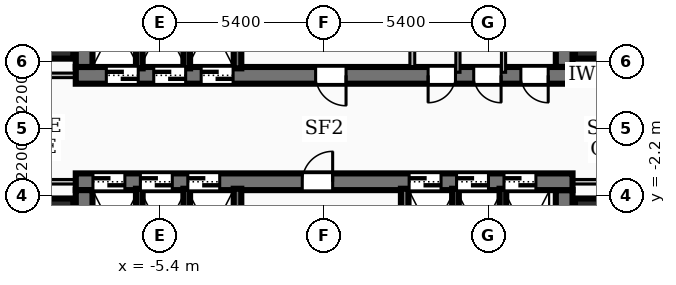
"""IFC4 building model, lengths in metres.
Left out: names, types, materials, properties, quantities, classifications, styles, units other than length and angle.
Written with IfcOpenShell. Run it as: python <this file> out.ifc"""

import sys

from ifc_helpers import new_model, si_unit, direction, frame, frame_2d, origin, origin_2d, place, context, subcontext, project, spatial, rectangle, extrude, element, fill, save


model = new_model("IFC4")
c1 = context("Model", 3, precision=1e-05, world=origin(), true_north=direction((0.0, 1.0)))
c2 = subcontext(c1, "Body", "Model", "MODEL_VIEW")
j1 = project(units=[si_unit("LENGTHUNIT", "METRE"), si_unit("PLANEANGLEUNIT", "RADIAN")], contexts=[c1])
p1 = place(None, origin())
s1 = spatial("IfcSite", under=j1, at=p1, CompositionType="ELEMENT")
p2 = place(p1, origin())
s2 = spatial("IfcBuilding", under=s1, at=p2, CompositionType="ELEMENT")
p3 = place(p2, frame((0.0, 0.0, 19.44)))
s3 = spatial("IfcBuildingStorey", under=s2, at=p3, CompositionType="ELEMENT", Elevation=19.44)
p4 = place(p3, frame((8.17, 1.75, 0.0), z_axis=(0.0, 0.0, 1.0), x_axis=(-1.0, 0.0, 0.0)))
e1 = element("IfcWall", 1, at=p4, inside=s3, PredefinedType="SHEAR", context=c2, shape_type="SweptSolid", body=[
    extrude(rectangle(XDim=16.34, YDim=0.55, at=frame_2d((8.17, 0.0))), origin(), (0.0, 0.0, 1.0), 4.78),
])
p5 = place(p4, frame((7.45, 0.0, 0.0)))
e2 = element("IfcOpeningElement", 2, at=p5, cuts=e1, PredefinedType="OPENING", context=c2, shape_type="SweptSolid", body=[
    extrude(rectangle(XDim=1.0, YDim=2.1, at=frame_2d((0.5, 1.05))), frame((0.0, 0.285, 0.0), z_axis=(0.0, -1.0, 0.0), x_axis=(1.0, 0.0, 0.0)), (0.0, 0.0, 1.0), 0.57),
])
p6 = place(p4, frame((14.285, 0.0, 0.0)))
e3 = element("IfcOpeningElement", 3, at=p6, cuts=e1, PredefinedType="OPENING", context=c2, shape_type="SweptSolid", body=[
    extrude(rectangle(XDim=1.05, YDim=2.15, at=frame_2d((0.525, 1.075))), frame((0.0, 0.285, 0.0), z_axis=(0.0, -1.0, 0.0), x_axis=(1.0, 0.0, 0.0)), (0.0, 0.0, 1.0), 0.57),
])
p7 = place(p4, frame((12.725, 0.0, 0.0)))
e4 = element("IfcOpeningElement", 4, at=p7, cuts=e1, PredefinedType="OPENING", context=c2, shape_type="SweptSolid", body=[
    extrude(rectangle(XDim=1.05, YDim=2.15, at=frame_2d((0.525, 1.075))), frame((0.0, 0.285, 0.0), z_axis=(0.0, -1.0, 0.0), x_axis=(1.0, 0.0, 0.0)), (0.0, 0.0, 1.0), 0.57),
])
p8 = place(p4, frame((11.165, 0.0, 0.0)))
e5 = element("IfcOpeningElement", 5, at=p8, cuts=e1, PredefinedType="OPENING", context=c2, shape_type="SweptSolid", body=[
    extrude(rectangle(XDim=1.05, YDim=2.15, at=frame_2d((0.525, 1.075))), frame((0.0, 0.285, 0.0), z_axis=(0.0, -1.0, 0.0), x_axis=(1.0, 0.0, 0.0)), (0.0, 0.0, 1.0), 0.57),
])
p9 = place(p4, frame((3.85, 0.0, 0.0)))
e6 = element("IfcOpeningElement", 6, at=p9, cuts=e1, PredefinedType="OPENING", context=c2, shape_type="SweptSolid", body=[
    extrude(rectangle(XDim=0.9, YDim=2.06, at=frame_2d((0.45, 1.03))), frame((0.0, 0.285, 0.0), z_axis=(0.0, -1.0, 0.0), x_axis=(1.0, 0.0, 0.0)), (0.0, 0.0, 1.0), 0.57),
])
p10 = place(p4, frame((2.35, 0.0, 0.0)))
e7 = element("IfcOpeningElement", 7, at=p10, cuts=e1, PredefinedType="OPENING", context=c2, shape_type="SweptSolid", body=[
    extrude(rectangle(XDim=0.9, YDim=2.06, at=frame_2d((0.45, 1.03))), frame((0.0, 0.285, 0.0), z_axis=(0.0, -1.0, 0.0), x_axis=(1.0, 0.0, 0.0)), (0.0, 0.0, 1.0), 0.57),
])
p11 = place(p4, frame((0.8, 0.0, 0.0)))
e8 = element("IfcOpeningElement", 8, at=p11, cuts=e1, PredefinedType="OPENING", context=c2, shape_type="SweptSolid", body=[
    extrude(rectangle(XDim=0.9, YDim=2.06, at=frame_2d((0.45, 1.03))), frame((0.0, 0.285, 0.0), z_axis=(0.0, -1.0, 0.0), x_axis=(1.0, 0.0, 0.0)), (0.0, 0.0, 1.0), 0.57),
])
for number, where, z_axis, x_axis in (
    (9, (-7.895, 2.025, 0.0), (0.0, 0.0, 1.0), (0.0, 1.0, 0.0)),
    (10, (7.895, 8.31, 0.0), (0.0, 0.0, 1.0), (0.0, -1.0, 0.0)),
):
    element("IfcWall", number, at=place(p3, frame(where, z_axis=z_axis, x_axis=x_axis)), inside=s3, PredefinedType="SHEAR", context=c2, shape_type="SweptSolid", body=[
        extrude(rectangle(XDim=6.285, YDim=0.55, at=frame_2d((3.143, 0.0))), origin(), (0.0, 0.0, 1.0), 4.78),
    ])
p12 = place(p3, frame((-8.17, -1.75, 0.0), z_axis=(0.0, 0.0, 1.0), x_axis=(1.0, 0.0, 0.0)))
e11 = element("IfcWall", 11, at=p12, inside=s3, PredefinedType="SHEAR", context=c2, shape_type="SweptSolid", body=[
    extrude(rectangle(XDim=16.34, YDim=0.55, at=frame_2d((8.17, 0.0))), origin(), (0.0, 0.0, 1.0), 4.78),
])
p13 = place(p12, frame((7.45, 0.0, 0.0)))
e12 = element("IfcOpeningElement", 12, at=p13, cuts=e11, PredefinedType="OPENING", context=c2, shape_type="SweptSolid", body=[
    extrude(rectangle(XDim=1.0, YDim=2.1, at=frame_2d((0.5, 1.05))), frame((0.0, 0.285, 0.0), z_axis=(0.0, -1.0, 0.0), x_axis=(1.0, 0.0, 0.0)), (0.0, 0.0, 1.0), 0.57),
])
p14 = place(p12, frame((10.965, 0.0, 0.0)))
e13 = element("IfcOpeningElement", 13, at=p14, cuts=e11, PredefinedType="OPENING", context=c2, shape_type="SweptSolid", body=[
    extrude(rectangle(XDim=1.05, YDim=2.15, at=frame_2d((0.525, 1.075))), frame((0.0, 0.285, 0.0), z_axis=(0.0, -1.0, 0.0), x_axis=(1.0, 0.0, 0.0)), (0.0, 0.0, 1.0), 0.57),
])
p15 = place(p12, frame((12.525, 0.0, 0.0)))
e14 = element("IfcOpeningElement", 14, at=p15, cuts=e11, PredefinedType="OPENING", context=c2, shape_type="SweptSolid", body=[
    extrude(rectangle(XDim=1.05, YDim=2.15, at=frame_2d((0.525, 1.075))), frame((0.0, 0.285, 0.0), z_axis=(0.0, -1.0, 0.0), x_axis=(1.0, 0.0, 0.0)), (0.0, 0.0, 1.0), 0.57),
])
p16 = place(p12, frame((14.085, 0.0, 0.0)))
e15 = element("IfcOpeningElement", 15, at=p16, cuts=e11, PredefinedType="OPENING", context=c2, shape_type="SweptSolid", body=[
    extrude(rectangle(XDim=1.05, YDim=2.15, at=frame_2d((0.525, 1.075))), frame((0.0, 0.285, 0.0), z_axis=(0.0, -1.0, 0.0), x_axis=(1.0, 0.0, 0.0)), (0.0, 0.0, 1.0), 0.57),
])
p17 = place(p12, frame((0.565, 0.0, 0.0)))
e16 = element("IfcOpeningElement", 16, at=p17, cuts=e11, PredefinedType="OPENING", context=c2, shape_type="SweptSolid", body=[
    extrude(rectangle(XDim=1.05, YDim=2.15, at=frame_2d((0.525, 1.075))), frame((0.0, 0.285, 0.0), z_axis=(0.0, -1.0, 0.0), x_axis=(1.0, 0.0, 0.0)), (0.0, 0.0, 1.0), 0.57),
])
p18 = place(p12, frame((2.125, 0.0, 0.0)))
e17 = element("IfcOpeningElement", 17, at=p18, cuts=e11, PredefinedType="OPENING", context=c2, shape_type="SweptSolid", body=[
    extrude(rectangle(XDim=1.05, YDim=2.15, at=frame_2d((0.525, 1.075))), frame((0.0, 0.285, 0.0), z_axis=(0.0, -1.0, 0.0), x_axis=(1.0, 0.0, 0.0)), (0.0, 0.0, 1.0), 0.57),
])
p19 = place(p12, frame((3.685, 0.0, 0.0)))
e18 = element("IfcOpeningElement", 18, at=p19, cuts=e11, PredefinedType="OPENING", context=c2, shape_type="SweptSolid", body=[
    extrude(rectangle(XDim=1.05, YDim=2.15, at=frame_2d((0.525, 1.075))), frame((0.0, 0.285, 0.0), z_axis=(0.0, -1.0, 0.0), x_axis=(1.0, 0.0, 0.0)), (0.0, 0.0, 1.0), 0.57),
])
for number, where, z_axis, x_axis in (
    (19, (-7.895, -8.31, 0.0), (0.0, 0.0, 1.0), (0.0, 1.0, 0.0)),
    (20, (7.895, -2.025, 0.0), (0.0, 0.0, 1.0), (0.0, -1.0, 0.0)),
):
    element("IfcWall", number, at=place(p3, frame(where, z_axis=z_axis, x_axis=x_axis)), inside=s3, PredefinedType="SHEAR", context=c2, shape_type="SweptSolid", body=[
        extrude(rectangle(XDim=6.285, YDim=0.55, at=frame_2d((3.143, 0.0))), origin(), (0.0, 0.0, 1.0), 4.78),
    ])
for number, where, z_axis, x_axis in (
    (21, (-2.85, 1.98, 0.0), (0.0, 0.0, 1.0), (0.0, 1.0, 0.0)),
    (22, (-2.85, -5.05, 0.0), (0.0, 0.0, 1.0), (0.0, 1.0, 0.0)),
    (23, (2.65, -5.05, 0.0), (0.0, 0.0, 1.0), (0.0, 1.0, 0.0)),
):
    element("IfcWall", number, at=place(p3, frame(where, z_axis=z_axis, x_axis=x_axis)), inside=s3, PredefinedType="SOLIDWALL", context=c2, shape_type="SweptSolid", body=[
        extrude(rectangle(XDim=3.07, YDim=0.25, at=frame_2d((1.535, 0.0))), origin(), (0.0, 0.0, 1.0), 4.78),
    ])
for number, where, z_axis, x_axis in (
    (24, (-6.08, 1.98, 0.0), (0.0, 0.0, 1.0), (0.0, 1.0, 0.0)),
    (25, (-4.52, 1.98, 0.0), (0.0, 0.0, 1.0), (0.0, 1.0, 0.0)),
    (26, (4.32, -5.05, 0.0), (0.0, 0.0, 1.0), (0.0, 1.0, 0.0)),
    (27, (5.88, -5.05, 0.0), (0.0, 0.0, 1.0), (0.0, 1.0, 0.0)),
    (28, (-6.08, -5.05, 0.0), (0.0, 0.0, 1.0), (0.0, 1.0, 0.0)),
    (29, (-4.52, -5.05, 0.0), (0.0, 0.0, 1.0), (0.0, 1.0, 0.0)),
):
    element("IfcWall", number, at=place(p3, frame(where, z_axis=z_axis, x_axis=x_axis)), inside=s3, PredefinedType="SOLIDWALL", context=c2, shape_type="SweptSolid", body=[
        extrude(rectangle(XDim=3.07, YDim=0.22, at=frame_2d((1.535, 0.0))), origin(), (0.0, 0.0, 1.0), 4.78),
    ])
for number, where, z_axis, x_axis in (
    (30, (-8.85, -2.9, 0.0), (0.0, 0.0, 1.0), (1.0, 0.0, 0.0)),
    (31, (-8.85, 2.9, 0.0), (0.0, 0.0, 1.0), (1.0, 0.0, 0.0)),
    (32, (8.85, -2.9, 0.0), (0.0, 0.0, 1.0), (1.0, 0.0, 0.0)),
    (33, (8.85, 2.9, 0.0), (0.0, 0.0, 1.0), (1.0, 0.0, 0.0)),
):
    element("IfcColumn", number, at=place(p3, frame(where, z_axis=z_axis, x_axis=x_axis)), inside=s3, PredefinedType="COLUMN", context=c2, shape_type="SweptSolid", body=[
        extrude(rectangle(XDim=1.2, YDim=1.2, at=origin_2d()), origin(), (0.0, 0.0, 1.0), 5.04),
    ])
p20 = place(p3, frame((2.9, 2.04, 0.0), z_axis=(0.0, 0.0, 1.0), x_axis=(0.0, 1.0, 0.0)))
e34 = element("IfcWall", 34, at=p20, inside=s3, PredefinedType="PARTITIONING", context=c2, shape_type="SweptSolid", body=[
    extrude(rectangle(XDim=2.94, YDim=0.16, at=frame_2d((1.47, 0.0))), origin(), (0.0, 0.0, 1.0), 3.845),
])
p21 = place(p20, frame((1.82, 0.0, 0.0)))
e35 = element("IfcOpeningElement", 35, at=p21, cuts=e34, PredefinedType="OPENING", context=c2, shape_type="SweptSolid", body=[
    extrude(rectangle(XDim=0.9, YDim=2.06, at=frame_2d((0.45, 1.03))), frame((0.0, 0.09, 0.0), z_axis=(0.0, -1.0, 0.0), x_axis=(1.0, 0.0, 0.0)), (0.0, 0.0, 1.0), 0.18),
])
for number, where, z_axis, x_axis in (
    (36, (4.4, 1.85, 0.0), (0.0, 0.0, 1.0), (0.0, 1.0, 0.0)),
    (37, (5.9, 1.85, 0.0), (0.0, 0.0, 1.0), (0.0, 1.0, 0.0)),
):
    element("IfcWall", number, at=place(p3, frame(where, z_axis=z_axis, x_axis=x_axis)), inside=s3, PredefinedType="PARTITIONING", context=c2, shape_type="SweptSolid", body=[
        extrude(rectangle(XDim=1.89, YDim=0.138, at=frame_2d((0.945, 0.0))), origin(), (0.0, 0.0, 1.0), 3.845),
    ])
for number, where, z_axis, x_axis in (
    (38, (-7.85, 1.75, 0.0), (0.0, 0.0, 1.0), (-1.0, 0.0, 0.0)),
    (39, (-7.85, -1.75, 0.0), (0.0, 0.0, 1.0), (-1.0, 0.0, 0.0)),
    (40, (7.85, 1.75, 0.0), (0.0, 0.0, 1.0), (1.0, 0.0, 0.0)),
    (41, (7.85, -1.75, 0.0), (0.0, 0.0, 1.0), (1.0, 0.0, 0.0)),
):
    element("IfcWall", number, at=place(p3, frame(where, z_axis=z_axis, x_axis=x_axis)), inside=s3, PredefinedType="PARTITIONING", context=c2, shape_type="SweptSolid", body=[
        extrude(rectangle(XDim=1.67, YDim=0.15, at=frame_2d((0.835, 0.0))), origin(), (0.0, 0.0, 1.0), 3.845),
    ])
p22 = place(p5, origin())
e42 = element("IfcDoor", 42, at=p22, inside=s3, OperationType="SINGLE_SWING_LEFT", PredefinedType="DOOR", context=c2, shape_type="SweptSolid", body=[
    extrude(rectangle(XDim=1.0, YDim=2.1, at=frame_2d((0.5, 1.05))), frame((0.0, 0.025, 0.0), z_axis=(0.0, -1.0, 0.0), x_axis=(1.0, 0.0, 0.0)), (0.0, 0.0, 1.0), 0.05),
])
fill(e2, e42)
p23 = place(p13, origin())
e43 = element("IfcDoor", 43, at=p23, inside=s3, OperationType="SINGLE_SWING_RIGHT", PredefinedType="DOOR", context=c2, shape_type="SweptSolid", body=[
    extrude(rectangle(XDim=1.0, YDim=2.1, at=frame_2d((0.5, 1.05))), frame((0.0, 0.025, 0.0), z_axis=(0.0, -1.0, 0.0), x_axis=(1.0, 0.0, 0.0)), (0.0, 0.0, 1.0), 0.05),
])
fill(e12, e43)
p24 = place(p6, origin())
e44 = element("IfcDoor", 44, at=p24, inside=s3, OperationType="DOUBLE_DOOR_SLIDING", PredefinedType="DOOR", context=c2, shape_type="SweptSolid", body=[
    extrude(rectangle(XDim=1.05, YDim=2.15, at=frame_2d((0.525, 1.075))), frame((0.0, 0.025, 0.0), z_axis=(0.0, -1.0, 0.0), x_axis=(1.0, 0.0, 0.0)), (0.0, 0.0, 1.0), 0.05),
])
fill(e3, e44)
p25 = place(p7, origin())
e45 = element("IfcDoor", 45, at=p25, inside=s3, OperationType="DOUBLE_DOOR_SLIDING", PredefinedType="DOOR", context=c2, shape_type="SweptSolid", body=[
    extrude(rectangle(XDim=1.05, YDim=2.15, at=frame_2d((0.525, 1.075))), frame((0.0, 0.025, 0.0), z_axis=(0.0, -1.0, 0.0), x_axis=(1.0, 0.0, 0.0)), (0.0, 0.0, 1.0), 0.05),
])
fill(e4, e45)
p26 = place(p8, origin())
e46 = element("IfcDoor", 46, at=p26, inside=s3, OperationType="DOUBLE_DOOR_SLIDING", PredefinedType="DOOR", context=c2, shape_type="SweptSolid", body=[
    extrude(rectangle(XDim=1.05, YDim=2.15, at=frame_2d((0.525, 1.075))), frame((0.0, 0.025, 0.0), z_axis=(0.0, -1.0, 0.0), x_axis=(1.0, 0.0, 0.0)), (0.0, 0.0, 1.0), 0.05),
])
fill(e5, e46)
p27 = place(p14, origin())
e47 = element("IfcDoor", 47, at=p27, inside=s3, OperationType="DOUBLE_DOOR_SLIDING", PredefinedType="DOOR", context=c2, shape_type="SweptSolid", body=[
    extrude(rectangle(XDim=1.05, YDim=2.15, at=frame_2d((0.525, 1.075))), frame((0.0, 0.025, 0.0), z_axis=(0.0, -1.0, 0.0), x_axis=(1.0, 0.0, 0.0)), (0.0, 0.0, 1.0), 0.05),
])
fill(e13, e47)
p28 = place(p15, origin())
e48 = element("IfcDoor", 48, at=p28, inside=s3, OperationType="DOUBLE_DOOR_SLIDING", PredefinedType="DOOR", context=c2, shape_type="SweptSolid", body=[
    extrude(rectangle(XDim=1.05, YDim=2.15, at=frame_2d((0.525, 1.075))), frame((0.0, 0.025, 0.0), z_axis=(0.0, -1.0, 0.0), x_axis=(1.0, 0.0, 0.0)), (0.0, 0.0, 1.0), 0.05),
])
fill(e14, e48)
p29 = place(p16, origin())
e49 = element("IfcDoor", 49, at=p29, inside=s3, OperationType="DOUBLE_DOOR_SLIDING", PredefinedType="DOOR", context=c2, shape_type="SweptSolid", body=[
    extrude(rectangle(XDim=1.05, YDim=2.15, at=frame_2d((0.525, 1.075))), frame((0.0, 0.025, 0.0), z_axis=(0.0, -1.0, 0.0), x_axis=(1.0, 0.0, 0.0)), (0.0, 0.0, 1.0), 0.05),
])
fill(e15, e49)
p30 = place(p17, origin())
e50 = element("IfcDoor", 50, at=p30, inside=s3, OperationType="DOUBLE_DOOR_SLIDING", PredefinedType="DOOR", context=c2, shape_type="SweptSolid", body=[
    extrude(rectangle(XDim=1.05, YDim=2.15, at=frame_2d((0.525, 1.075))), frame((0.0, 0.025, 0.0), z_axis=(0.0, -1.0, 0.0), x_axis=(1.0, 0.0, 0.0)), (0.0, 0.0, 1.0), 0.05),
])
fill(e16, e50)
p31 = place(p18, origin())
e51 = element("IfcDoor", 51, at=p31, inside=s3, OperationType="DOUBLE_DOOR_SLIDING", PredefinedType="DOOR", context=c2, shape_type="SweptSolid", body=[
    extrude(rectangle(XDim=1.05, YDim=2.15, at=frame_2d((0.525, 1.075))), frame((0.0, 0.025, 0.0), z_axis=(0.0, -1.0, 0.0), x_axis=(1.0, 0.0, 0.0)), (0.0, 0.0, 1.0), 0.05),
])
fill(e17, e51)
p32 = place(p19, origin())
e52 = element("IfcDoor", 52, at=p32, inside=s3, OperationType="DOUBLE_DOOR_SLIDING", PredefinedType="DOOR", context=c2, shape_type="SweptSolid", body=[
    extrude(rectangle(XDim=1.05, YDim=2.15, at=frame_2d((0.525, 1.075))), frame((0.0, 0.025, 0.0), z_axis=(0.0, -1.0, 0.0), x_axis=(1.0, 0.0, 0.0)), (0.0, 0.0, 1.0), 0.05),
])
fill(e18, e52)
p33 = place(p9, origin())
e53 = element("IfcDoor", 53, at=p33, inside=s3, OperationType="SINGLE_SWING_RIGHT", PredefinedType="DOOR", context=c2, shape_type="SweptSolid", body=[
    extrude(rectangle(XDim=0.9, YDim=2.06, at=frame_2d((0.45, 1.03))), frame((0.0, 0.025, 0.0), z_axis=(0.0, -1.0, 0.0), x_axis=(1.0, 0.0, 0.0)), (0.0, 0.0, 1.0), 0.05),
])
fill(e6, e53)
p34 = place(p10, origin())
e54 = element("IfcDoor", 54, at=p34, inside=s3, OperationType="SINGLE_SWING_LEFT", PredefinedType="DOOR", context=c2, shape_type="SweptSolid", body=[
    extrude(rectangle(XDim=0.9, YDim=2.06, at=frame_2d((0.45, 1.03))), frame((0.0, 0.025, 0.0), z_axis=(0.0, -1.0, 0.0), x_axis=(1.0, 0.0, 0.0)), (0.0, 0.0, 1.0), 0.05),
])
fill(e7, e54)
p35 = place(p11, origin())
e55 = element("IfcDoor", 55, at=p35, inside=s3, OperationType="SINGLE_SWING_LEFT", PredefinedType="DOOR", context=c2, shape_type="SweptSolid", body=[
    extrude(rectangle(XDim=0.9, YDim=2.06, at=frame_2d((0.45, 1.03))), frame((0.0, 0.025, 0.0), z_axis=(0.0, -1.0, 0.0), x_axis=(1.0, 0.0, 0.0)), (0.0, 0.0, 1.0), 0.05),
])
fill(e8, e55)
save(model, sys.argv[1])
